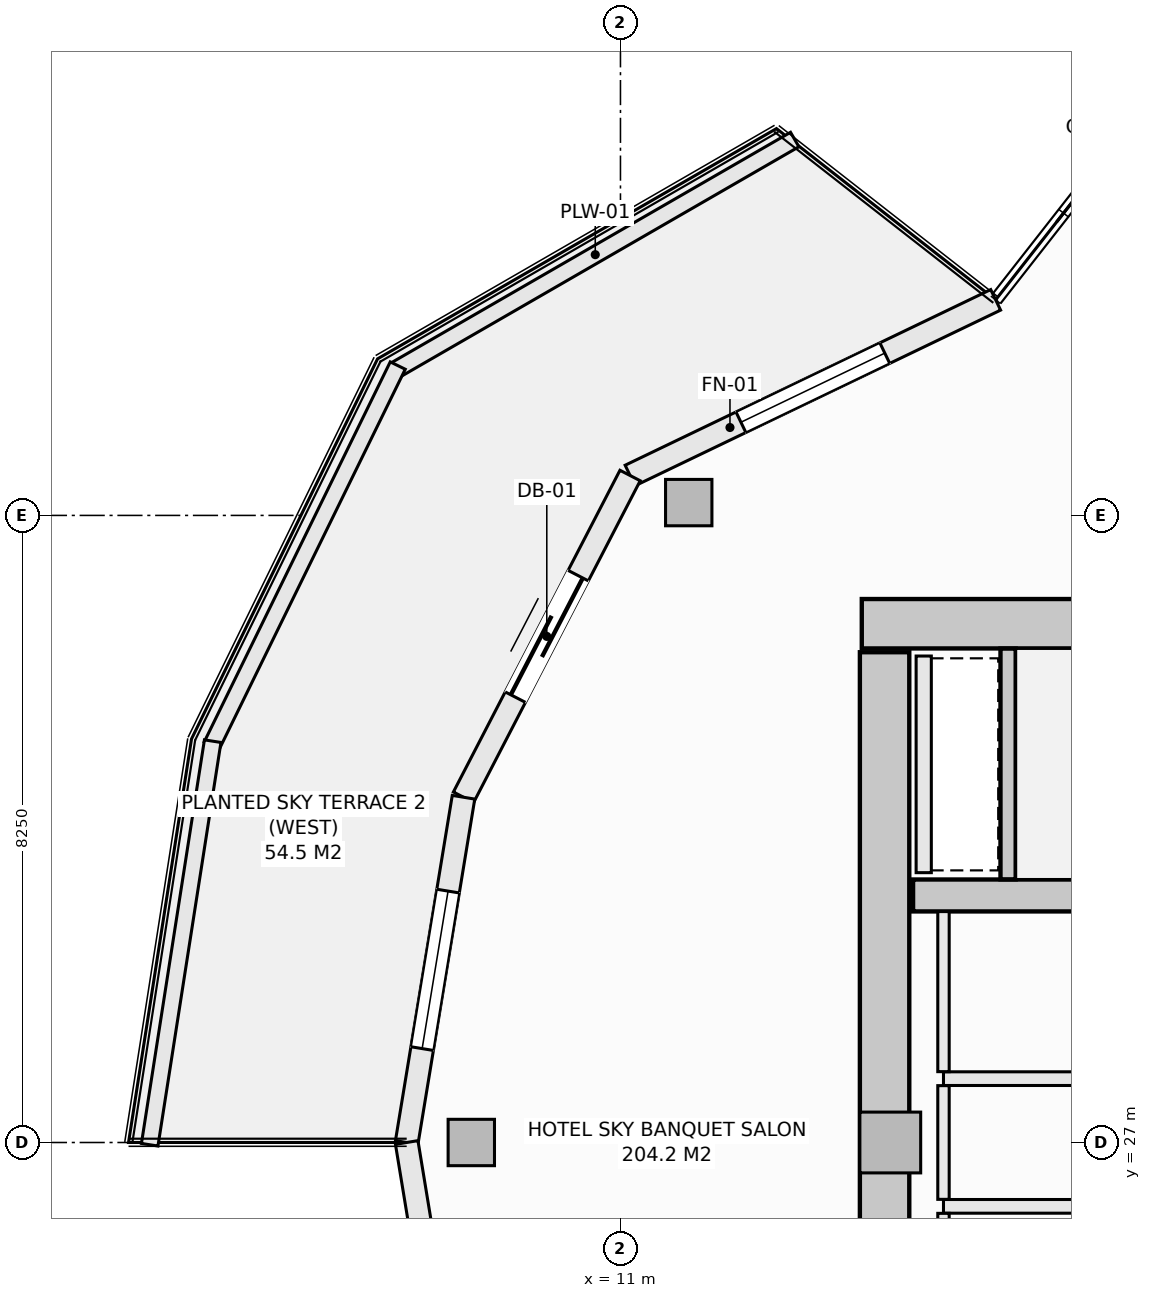
"""IFC4 building model, lengths in metres.
Left out: names, types, materials, properties, quantities, classifications, styles, units other than length and angle.
Written with IfcOpenShell. Run it as: python <this file> out.ifc"""

import sys

from ifc_helpers import new_model, si_unit, direction, frame, frame_2d, origin, origin_2d, place, context, subcontext, project, spatial, rectangle, hollow_rectangle, extrude, element, fill, save


model = new_model("IFC4")
c1 = context("Model", 3, precision=1e-05, world=origin(), true_north=direction((0.0, 1.0)))
c2 = subcontext(c1, "Body", "Model", "MODEL_VIEW")
j1 = project(units=[si_unit("LENGTHUNIT", "METRE"), si_unit("PLANEANGLEUNIT", "RADIAN")], contexts=[c1])
p1 = place(None, origin())
s1 = spatial("IfcSite", under=j1, at=p1, CompositionType="ELEMENT")
p2 = place(p1, origin())
s2 = spatial("IfcBuilding", under=s1, at=p2, CompositionType="ELEMENT")
p3 = place(p2, frame((0.0, 0.0, 142.7)))
s3 = spatial("IfcBuildingStorey", under=s2, at=p3, CompositionType="ELEMENT", Elevation=142.7)
p4 = place(p3, frame((14.175, 33.825, -0.27), z_axis=(0.0, 0.0, 1.0), x_axis=(1.0, 0.0, 0.0)))
e1 = element("IfcWall", 1, at=p4, inside=s3, PredefinedType="SHEAR", context=c2, shape_type="SweptSolid", body=[
    extrude(rectangle(XDim=13.65, YDim=0.65, at=frame_2d((6.825, 0.0))), origin(), (0.0, 0.0, 1.0), 3.4),
])
p5 = place(p3, frame((14.475, 20.55, -0.27), z_axis=(0.0, 0.0, 1.0), x_axis=(0.0, 1.0, 0.0)))
e2 = element("IfcWall", 2, at=p5, inside=s3, PredefinedType="SHEAR", context=c2, shape_type="SweptSolid", body=[
    extrude(rectangle(XDim=12.9, YDim=0.65, at=frame_2d((6.45, 0.0))), origin(), (0.0, 0.0, 1.0), 3.4),
])
p6 = place(p3, frame((14.85, 30.25, -0.27), z_axis=(0.0, 0.0, 1.0), x_axis=(1.0, 0.0, 0.0)))
e3 = element("IfcWall", 3, at=p6, inside=s3, PredefinedType="SHEAR", context=c2, shape_type="SweptSolid", body=[
    extrude(rectangle(XDim=7.3, YDim=0.42, at=frame_2d((3.65, 0.0))), origin(), (0.0, 0.0, 1.0), 3.4),
])
for number, where, z_axis, x_axis in (
    (4, (11.898, 35.419, -0.27), (0.0, 0.0, 1.0), (1.0, 0.0, 0.0)),
    (5, (9.038, 27.0, -0.27), (0.0, 0.0, 1.0), (1.0, 0.0, 0.0)),
):
    element("IfcColumn", number, at=place(p3, frame(where, z_axis=z_axis, x_axis=x_axis)), inside=s3, PredefinedType="COLUMN", context=c2, shape_type="SweptSolid", body=[
        extrude(hollow_rectangle(XDim=0.61, YDim=0.61, WallThickness=0.025, at=origin_2d()), origin(), (0.0, 0.0, 1.0), 3.4),
    ])
p7 = place(p3, frame((14.55, 27.0, -0.27), z_axis=(0.0, 0.0, 1.0), x_axis=(1.0, 0.0, 0.0)))
e6 = element("IfcColumn", 6, at=p7, inside=s3, PredefinedType="PILASTER", context=c2, shape_type="SweptSolid", body=[
    extrude(rectangle(XDim=0.8, YDim=0.8, at=origin_2d()), origin(), (0.0, 0.0, 1.0), 3.4),
])
p8 = place(p3, frame((11.127, 35.775, 0.0), z_axis=(0.0, 0.0, 1.0), x_axis=(0.901353070301, 0.433085029363, 0.0)))
e7 = element("IfcWall", 7, at=p8, inside=s3, PredefinedType="SOLIDWALL", context=c2, shape_type="SweptSolid", body=[
    extrude(rectangle(XDim=5.336, YDim=0.3, at=frame_2d((2.668, 0.0))), origin(), (0.0, 0.0, 1.0), 2.653),
])
p9 = place(p8, frame((1.618, 0.0, 0.74)))
e8 = element("IfcOpeningElement", 8, at=p9, cuts=e7, PredefinedType="OPENING", context=c2, shape_type="SweptSolid", body=[
    extrude(rectangle(XDim=2.1, YDim=1.7, at=frame_2d((1.05, 0.85))), frame((0.0, 0.16, 0.0), z_axis=(0.0, -1.0, 0.0), x_axis=(1.0, 0.0, 0.0)), (0.0, 0.0, 1.0), 0.32),
])
p10 = place(p3, frame((8.935, 31.542, 0.0), z_axis=(0.0, 0.0, 1.0), x_axis=(0.459810251451, 0.888017191647, 0.0)))
e9 = element("IfcWall", 9, at=p10, inside=s3, PredefinedType="SOLIDWALL", context=c2, shape_type="SweptSolid", body=[
    extrude(rectangle(XDim=4.766, YDim=0.3, at=frame_2d((2.383, 0.0))), origin(), (0.0, 0.0, 1.0), 2.653),
])
p11 = place(p10, frame((1.483, 0.0, 0.0)))
e10 = element("IfcOpeningElement", 10, at=p11, cuts=e9, PredefinedType="OPENING", context=c2, shape_type="SweptSolid", body=[
    extrude(rectangle(XDim=1.8, YDim=2.25, at=frame_2d((0.9, 1.125))), frame((0.0, 0.16, 0.0), z_axis=(0.0, -1.0, 0.0), x_axis=(1.0, 0.0, 0.0)), (0.0, 0.0, 1.0), 0.32),
])
p12 = place(p3, frame((8.188, 27.0, 0.0), z_axis=(0.0, 0.0, 1.0), x_axis=(0.162394765401, 0.986725868806, 0.0)))
e11 = element("IfcWall", 11, at=p12, inside=s3, PredefinedType="SOLIDWALL", context=c2, shape_type="SweptSolid", body=[
    extrude(rectangle(XDim=4.603, YDim=0.3, at=frame_2d((2.302, 0.0))), origin(), (0.0, 0.0, 1.0), 2.653),
])
p13 = place(p12, frame((1.252, 0.0, 0.74)))
e12 = element("IfcOpeningElement", 12, at=p13, cuts=e11, PredefinedType="OPENING", context=c2, shape_type="SweptSolid", body=[
    extrude(rectangle(XDim=2.1, YDim=1.7, at=frame_2d((1.05, 0.85))), frame((0.0, 0.16, 0.0), z_axis=(0.0, -1.0, 0.0), x_axis=(1.0, 0.0, 0.0)), (0.0, 0.0, 1.0), 0.32),
])
p14 = place(p3, frame((8.188, 27.0, 0.0), z_axis=(0.0, 0.0, 1.0), x_axis=(0.162394765401, -0.986725868806, 0.0)))
e13 = element("IfcWall", 13, at=p14, inside=s3, PredefinedType="SOLIDWALL", context=c2, shape_type="SweptSolid", body=[
    extrude(rectangle(XDim=4.603, YDim=0.3, at=frame_2d((2.302, 0.0))), origin(), (0.0, 0.0, 1.0), 2.653),
])
p15 = place(p14, frame((1.252, 0.0, 0.74)))
e14 = element("IfcOpeningElement", 14, at=p15, cuts=e13, PredefinedType="OPENING", context=c2, shape_type="SweptSolid", body=[
    extrude(rectangle(XDim=2.1, YDim=1.7, at=frame_2d((1.05, 0.85))), frame((0.0, 0.16, 0.0), z_axis=(0.0, -1.0, 0.0), x_axis=(1.0, 0.0, 0.0)), (0.0, 0.0, 1.0), 0.32),
])
p16 = place(p3, frame((8.044, 37.166, 0.0), z_axis=(0.0, 0.0, 1.0), x_axis=(0.866058128659, 0.499943314571, 0.0)))
e15 = element("IfcWall", 15, at=p16, inside=s3, PredefinedType="PARAPET", context=c2, shape_type="SweptSolid", body=[
    extrude(rectangle(XDim=6.06, YDim=0.22, at=frame_2d((3.03, 0.0))), origin(), (0.0, 0.0, 1.0), 0.52),
])
p17 = place(p3, frame((5.622, 32.221, 0.0), z_axis=(0.0, 0.0, 1.0), x_axis=(0.439637174641, 0.898175458735, 0.0)))
e16 = element("IfcWall", 16, at=p17, inside=s3, PredefinedType="PARAPET", context=c2, shape_type="SweptSolid", body=[
    extrude(rectangle(XDim=5.567, YDim=0.22, at=frame_2d((2.784, 0.0))), origin(), (0.0, 0.0, 1.0), 0.52),
])
p18 = place(p3, frame((4.806, 26.971, 0.0), z_axis=(0.0, 0.0, 1.0), x_axis=(0.154245214003, 0.988032597619, 0.0)))
e17 = element("IfcWall", 17, at=p18, inside=s3, PredefinedType="PARAPET", context=c2, shape_type="SweptSolid", body=[
    extrude(rectangle(XDim=5.374, YDim=0.22, at=frame_2d((2.687, 0.0))), origin(), (0.0, 0.0, 1.0), 0.52),
])
p19 = place(p3, frame((16.1, 30.462, -0.27), z_axis=(0.0, 0.0, 1.0), x_axis=(0.0, 1.0, 0.0)))
e18 = element("IfcWall", 18, at=p19, inside=s3, PredefinedType="SHEAR", context=c2, shape_type="SweptSolid", body=[
    extrude(rectangle(XDim=3.036, YDim=0.2, at=frame_2d((1.518, 0.0))), origin(), (0.0, 0.0, 1.0), 3.4),
])
p20 = place(p3, frame((14.99, 30.55, 0.0), z_axis=(0.0, 0.0, 1.0), x_axis=(0.0, 1.0, 0.0)))
e19 = element("IfcWall", 19, at=p20, inside=s3, PredefinedType="SOLIDWALL", context=c2, shape_type="SweptSolid", body=[
    extrude(rectangle(XDim=2.85, YDim=0.2, at=frame_2d((1.425, 0.0))), origin(), (0.0, 0.0, 1.0), 3.13),
])
p21 = place(p3, frame((15.25, 27.84, 0.0), z_axis=(0.0, 0.0, 1.0), x_axis=(1.0, 0.0, 0.0)))
e20 = element("IfcWall", 20, at=p21, inside=s3, PredefinedType="SOLIDWALL", context=c2, shape_type="SweptSolid", body=[
    extrude(rectangle(XDim=6.9, YDim=0.18, at=frame_2d((3.45, 0.0))), origin(), (0.0, 0.0, 1.0), 3.13),
])
p22 = place(p21, frame((5.02, 0.0, 0.0)))
e21 = element("IfcOpeningElement", 21, at=p22, cuts=e20, PredefinedType="OPENING", context=c2, shape_type="SweptSolid", body=[
    extrude(rectangle(XDim=0.95, YDim=2.1, at=frame_2d((0.475, 1.05))), frame((0.0, 0.1, 0.0), z_axis=(0.0, -1.0, 0.0), x_axis=(1.0, 0.0, 0.0)), (0.0, 0.0, 1.0), 0.2),
])
p23 = place(p21, frame((1.98, 0.0, 0.0)))
e22 = element("IfcOpeningElement", 22, at=p23, cuts=e20, PredefinedType="OPENING", context=c2, shape_type="SweptSolid", body=[
    extrude(rectangle(XDim=0.95, YDim=2.1, at=frame_2d((0.475, 1.05))), frame((0.0, 0.1, 0.0), z_axis=(0.0, -1.0, 0.0), x_axis=(1.0, 0.0, 0.0)), (0.0, 0.0, 1.0), 0.2),
])
p24 = place(p3, frame((15.25, 26.16, 0.0), z_axis=(0.0, 0.0, 1.0), x_axis=(1.0, 0.0, 0.0)))
e23 = element("IfcWall", 23, at=p24, inside=s3, PredefinedType="SOLIDWALL", context=c2, shape_type="SweptSolid", body=[
    extrude(rectangle(XDim=6.9, YDim=0.18, at=frame_2d((3.45, 0.0))), origin(), (0.0, 0.0, 1.0), 3.13),
])
p25 = place(p24, frame((5.02, 0.0, 0.0)))
e24 = element("IfcOpeningElement", 24, at=p25, cuts=e23, PredefinedType="OPENING", context=c2, shape_type="SweptSolid", body=[
    extrude(rectangle(XDim=0.95, YDim=2.1, at=frame_2d((0.475, 1.05))), frame((0.0, 0.1, 0.0), z_axis=(0.0, -1.0, 0.0), x_axis=(1.0, 0.0, 0.0)), (0.0, 0.0, 1.0), 0.2),
])
p26 = place(p24, frame((1.98, 0.0, 0.0)))
e25 = element("IfcOpeningElement", 25, at=p26, cuts=e23, PredefinedType="OPENING", context=c2, shape_type="SweptSolid", body=[
    extrude(rectangle(XDim=0.95, YDim=2.1, at=frame_2d((0.475, 1.05))), frame((0.0, 0.1, 0.0), z_axis=(0.0, -1.0, 0.0), x_axis=(1.0, 0.0, 0.0)), (0.0, 0.0, 1.0), 0.2),
])
p27 = place(p3, frame((15.25, 23.962, 0.0), z_axis=(0.0, 0.0, 1.0), x_axis=(0.0, 1.0, 0.0)))
e26 = element("IfcWall", 26, at=p27, inside=s3, PredefinedType="PARTITIONING", context=c2, shape_type="SweptSolid", body=[
    extrude(rectangle(XDim=2.106, YDim=0.15, at=frame_2d((1.053, 0.0))), origin(), (0.0, 0.0, 1.0), 3.13),
])
p28 = place(p3, frame((15.25, 26.252, 0.0), z_axis=(0.0, 0.0, 1.0), x_axis=(0.0, 1.0, 0.0)))
e27 = element("IfcWall", 27, at=p28, inside=s3, PredefinedType="PARTITIONING", context=c2, shape_type="SweptSolid", body=[
    extrude(rectangle(XDim=1.496, YDim=0.15, at=frame_2d((0.748, 0.0))), origin(), (0.0, 0.0, 1.0), 3.13),
])
p29 = place(p3, frame((15.25, 27.932, 0.0), z_axis=(0.0, 0.0, 1.0), x_axis=(0.0, 1.0, 0.0)))
e28 = element("IfcWall", 28, at=p29, inside=s3, PredefinedType="PARTITIONING", context=c2, shape_type="SweptSolid", body=[
    extrude(rectangle(XDim=2.106, YDim=0.15, at=frame_2d((1.053, 0.0))), origin(), (0.0, 0.0, 1.0), 3.13),
])
p30 = place(p9, origin())
e29 = element("IfcWindow", 29, at=p30, inside=s3, PartitioningType="SINGLE_PANEL", PredefinedType="WINDOW", context=c2, shape_type="SweptSolid", body=[
    extrude(rectangle(XDim=2.1, YDim=1.7, at=frame_2d((1.05, 0.85))), frame((0.0, 0.03, 0.0), z_axis=(0.0, -1.0, 0.0), x_axis=(1.0, 0.0, 0.0)), (0.0, 0.0, 1.0), 0.06),
])
fill(e8, e29)
p31 = place(p11, origin())
e30 = element("IfcDoor", 30, at=p31, inside=s3, OperationType="SLIDING_TO_LEFT", PredefinedType="DOOR", context=c2, shape_type="SweptSolid", body=[
    extrude(rectangle(XDim=1.8, YDim=2.25, at=frame_2d((0.9, 1.125))), frame((0.0, 0.025, 0.0), z_axis=(0.0, -1.0, 0.0), x_axis=(1.0, 0.0, 0.0)), (0.0, 0.0, 1.0), 0.05),
])
fill(e10, e30)
p32 = place(p13, origin())
e31 = element("IfcWindow", 31, at=p32, inside=s3, PartitioningType="SINGLE_PANEL", PredefinedType="WINDOW", context=c2, shape_type="SweptSolid", body=[
    extrude(rectangle(XDim=2.1, YDim=1.7, at=frame_2d((1.05, 0.85))), frame((0.0, 0.03, 0.0), z_axis=(0.0, -1.0, 0.0), x_axis=(1.0, 0.0, 0.0)), (0.0, 0.0, 1.0), 0.06),
])
fill(e12, e31)
save(model, sys.argv[1])
